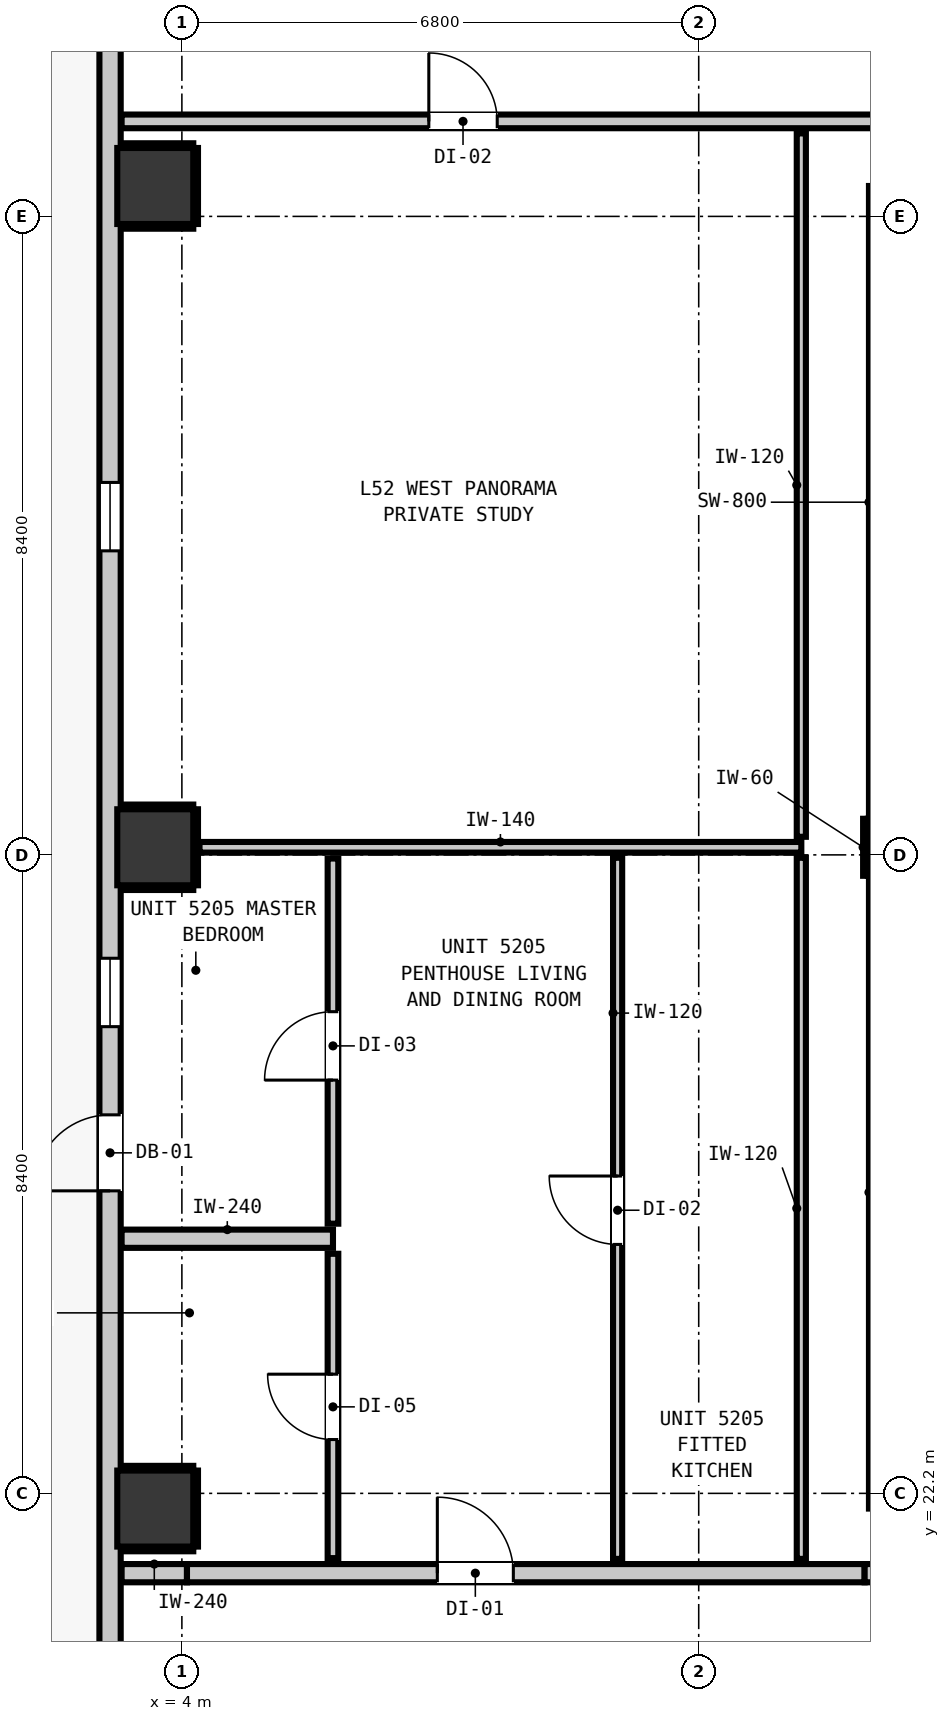
"""IFC4 building model, lengths in metres.
Left out: names, types, materials, properties, quantities, classifications, styles, units other than length and angle.
Written with IfcOpenShell. Run it as: python <this file> out.ifc"""

import sys

from ifc_helpers import new_model, si_unit, direction, frame, frame_2d, origin, origin_2d, place, context, subcontext, project, spatial, rectangle, extrude, element, fill, save


model = new_model("IFC4")
c1 = context("Model", 3, precision=1e-05, world=origin(), true_north=direction((0.0, 1.0)))
c2 = subcontext(c1, "Body", "Model", "MODEL_VIEW")
j1 = project(units=[si_unit("LENGTHUNIT", "METRE"), si_unit("PLANEANGLEUNIT", "RADIAN")], contexts=[c1])
p1 = place(None, origin())
s1 = spatial("IfcSite", under=j1, at=p1, CompositionType="ELEMENT")
p2 = place(p1, origin())
s2 = spatial("IfcBuilding", under=s1, at=p2, CompositionType="ELEMENT")
p3 = place(p2, frame((0.0, 0.0, 180.2)))
s3 = spatial("IfcBuildingStorey", under=s2, at=p3, CompositionType="ELEMENT", Elevation=180.2)
p4 = place(p3, frame((13.4, 30.7, 0.0), z_axis=(0.0, 0.0, 1.0), x_axis=(1.0, 0.0, 0.0)))
e1 = element("IfcColumn", 1, at=p4, inside=s3, PredefinedType="COLUMN", context=c2, shape_type="SweptSolid", body=[
    extrude(rectangle(XDim=0.75, YDim=0.75, at=origin_2d()), origin(), (0.0, 0.0, 1.0), 3.32),
])
p5 = place(p3, frame((13.44, 22.0, 0.0), z_axis=(0.0, 0.0, 1.0), x_axis=(0.0, 1.0, 0.0)))
e2 = element("IfcWall", 2, at=p5, inside=s3, PredefinedType="SHEAR", context=c2, shape_type="SweptSolid", body=[
    extrude(rectangle(XDim=8.32, YDim=0.8, at=frame_2d((4.16, 0.0))), origin(), (0.0, 0.0, 1.0), 3.32),
])
p6 = place(p3, frame((13.44, 31.08, 0.0), z_axis=(0.0, 0.0, 1.0), x_axis=(0.0, 1.0, 0.0)))
e3 = element("IfcWall", 3, at=p6, inside=s3, PredefinedType="SHEAR", context=c2, shape_type="SweptSolid", body=[
    extrude(rectangle(XDim=8.32, YDim=0.8, at=frame_2d((4.16, 0.0))), origin(), (0.0, 0.0, 1.0), 3.32),
])
for number, where, z_axis, x_axis in (
    (4, (3.65, 22.0, 0.0), (0.0, 0.0, 1.0), (1.0, 0.0, 0.0)),
    (5, (3.65, 30.7, 0.0), (0.0, 0.0, 1.0), (1.0, 0.0, 0.0)),
    (6, (3.65, 39.4, 0.0), (0.0, 0.0, 1.0), (1.0, 0.0, 0.0)),
):
    element("IfcColumn", number, at=place(p3, frame(where, z_axis=z_axis, x_axis=x_axis)), inside=s3, PredefinedType="COLUMN", context=c2, shape_type="SweptSolid", body=[
        extrude(rectangle(XDim=1.0, YDim=1.0, at=origin_2d()), origin(), (0.0, 0.0, 1.0), 3.32),
    ])
p7 = place(p3, frame((3.055, 17.555, 0.0), z_axis=(0.0, 0.0, 1.0), x_axis=(0.0, 1.0, 0.0)))
e7 = element("IfcWall", 7, at=p7, inside=s3, PredefinedType="STANDARD", context=c2, shape_type="SweptSolid", body=[
    extrude(rectangle(XDim=32.29, YDim=0.28, at=frame_2d((16.145, 0.0))), origin(), (0.0, 0.0, 1.0), 3.08),
])
p8 = place(p7, frame((8.625, 0.0, 0.0)))
e8 = element("IfcOpeningElement", 8, at=p8, cuts=e7, PredefinedType="OPENING", context=c2, shape_type="SweptSolid", body=[
    extrude(rectangle(XDim=1.0, YDim=2.15, at=frame_2d((0.5, 1.075))), frame((0.0, 0.15, 0.0), z_axis=(0.0, -1.0, 0.0), x_axis=(1.0, 0.0, 0.0)), (0.0, 0.0, 1.0), 0.3),
])
p9 = place(p7, frame((30.322, 0.0, 0.85)))
e9 = element("IfcOpeningElement", 9, at=p9, cuts=e7, PredefinedType="OPENING", context=c2, shape_type="SweptSolid", body=[
    extrude(rectangle(XDim=0.9, YDim=1.5, at=frame_2d((0.45, 0.75))), frame((0.0, 0.15, 0.0), z_axis=(0.0, -1.0, 0.0), x_axis=(1.0, 0.0, 0.0)), (0.0, 0.0, 1.0), 0.3),
])
p10 = place(p7, frame((10.785, 0.0, 0.85)))
e10 = element("IfcOpeningElement", 10, at=p10, cuts=e7, PredefinedType="OPENING", context=c2, shape_type="SweptSolid", body=[
    extrude(rectangle(XDim=0.9, YDim=1.5, at=frame_2d((0.45, 0.75))), frame((0.0, 0.15, 0.0), z_axis=(0.0, -1.0, 0.0), x_axis=(1.0, 0.0, 0.0)), (0.0, 0.0, 1.0), 0.3),
])
p11 = place(p7, frame((17.045, 0.0, 0.85)))
e11 = element("IfcOpeningElement", 11, at=p11, cuts=e7, PredefinedType="OPENING", context=c2, shape_type="SweptSolid", body=[
    extrude(rectangle(XDim=0.9, YDim=1.5, at=frame_2d((0.45, 0.75))), frame((0.0, 0.15, 0.0), z_axis=(0.0, -1.0, 0.0), x_axis=(1.0, 0.0, 0.0)), (0.0, 0.0, 1.0), 0.3),
])
p12 = place(p3, frame((3.207, 21.15, 0.0), z_axis=(0.0, 0.0, 1.0), x_axis=(1.0, 0.0, 0.0)))
e12 = element("IfcWall", 12, at=p12, inside=s3, PredefinedType="PARTITIONING", context=c2, shape_type="SweptSolid", body=[
    extrude(rectangle(XDim=0.86, YDim=0.24, at=frame_2d((0.43, 0.0))), origin(), (0.0, 0.0, 1.0), 3.08),
])
p13 = place(p3, frame((4.067, 21.15, 0.0), z_axis=(0.0, 0.0, 1.0), x_axis=(1.0, 0.0, 0.0)))
e13 = element("IfcWall", 13, at=p13, inside=s3, PredefinedType="PARTITIONING", context=c2, shape_type="SweptSolid", body=[
    extrude(rectangle(XDim=8.916, YDim=0.24, at=frame_2d((4.458, 0.0))), origin(), (0.0, 0.0, 1.0), 2.565),
])
p14 = place(p13, frame((3.294, 0.0, 0.0)))
e14 = element("IfcOpeningElement", 14, at=p14, cuts=e13, PredefinedType="OPENING", context=c2, shape_type="SweptSolid", body=[
    extrude(rectangle(XDim=1.0, YDim=2.15, at=frame_2d((0.5, 1.075))), frame((0.0, 0.13, 0.0), z_axis=(0.0, -1.0, 0.0), x_axis=(1.0, 0.0, 0.0)), (0.0, 0.0, 1.0), 0.26),
])
p15 = place(p3, frame((12.983, 21.15, 0.0), z_axis=(0.0, 0.0, 1.0), x_axis=(1.0, 0.0, 0.0)))
e15 = element("IfcWall", 15, at=p15, inside=s3, PredefinedType="PARTITIONING", context=c2, shape_type="SweptSolid", body=[
    extrude(rectangle(XDim=29.61, YDim=0.24, at=frame_2d((14.805, 0.0))), origin(), (0.0, 0.0, 1.0), 3.08),
])
p16 = place(p15, frame((5.227, 0.0, 0.0)))
e16 = element("IfcOpeningElement", 16, at=p16, cuts=e15, PredefinedType="OPENING", context=c2, shape_type="SweptSolid", body=[
    extrude(rectangle(XDim=1.1, YDim=2.15, at=frame_2d((0.55, 1.075))), frame((0.0, 0.13, 0.0), z_axis=(0.0, -1.0, 0.0), x_axis=(1.0, 0.0, 0.0)), (0.0, 0.0, 1.0), 0.26),
])
p17 = place(p15, frame((26.718, 0.0, 0.0)))
e17 = element("IfcOpeningElement", 17, at=p17, cuts=e15, PredefinedType="OPENING", context=c2, shape_type="SweptSolid", body=[
    extrude(rectangle(XDim=0.9, YDim=2.1, at=frame_2d((0.45, 1.05))), frame((0.0, 0.13, 0.0), z_axis=(0.0, -1.0, 0.0), x_axis=(1.0, 0.0, 0.0)), (0.0, 0.0, 1.0), 0.26),
])
p18 = place(p3, frame((3.207, 25.55, 0.0), z_axis=(0.0, 0.0, 1.0), x_axis=(1.0, 0.0, 0.0)))
e18 = element("IfcWall", 18, at=p18, inside=s3, PredefinedType="PARTITIONING", context=c2, shape_type="SweptSolid", body=[
    extrude(rectangle(XDim=2.781, YDim=0.24, at=frame_2d((1.391, 0.0))), origin(), (0.0, 0.0, 1.0), 3.08),
])
p19 = place(p3, frame((3.207, 40.25, 0.0), z_axis=(0.0, 0.0, 1.0), x_axis=(1.0, 0.0, 0.0)))
e19 = element("IfcWall", 19, at=p19, inside=s3, PredefinedType="PARTITIONING", context=c2, shape_type="SweptSolid", body=[
    extrude(rectangle(XDim=39.386, YDim=0.18, at=frame_2d((19.693, 0.0))), origin(), (0.0, 0.0, 1.0), 3.08),
])
p20 = place(p19, frame((14.228, 0.0, 0.0)))
e20 = element("IfcOpeningElement", 20, at=p20, cuts=e19, PredefinedType="OPENING", context=c2, shape_type="SweptSolid", body=[
    extrude(rectangle(XDim=1.4, YDim=2.15, at=frame_2d((0.7, 1.075))), frame((0.0, 0.1, 0.0), z_axis=(0.0, -1.0, 0.0), x_axis=(1.0, 0.0, 0.0)), (0.0, 0.0, 1.0), 0.2),
])
p21 = place(p19, frame((4.042, 0.0, 0.0)))
e21 = element("IfcOpeningElement", 21, at=p21, cuts=e19, PredefinedType="OPENING", context=c2, shape_type="SweptSolid", body=[
    extrude(rectangle(XDim=0.9, YDim=2.1, at=frame_2d((0.45, 1.05))), frame((0.0, 0.1, 0.0), z_axis=(0.0, -1.0, 0.0), x_axis=(1.0, 0.0, 0.0)), (0.0, 0.0, 1.0), 0.2),
])
p22 = place(p19, frame((36.444, 0.0, 0.0)))
e22 = element("IfcOpeningElement", 22, at=p22, cuts=e19, PredefinedType="OPENING", context=c2, shape_type="SweptSolid", body=[
    extrude(rectangle(XDim=1.0, YDim=2.15, at=frame_2d((0.5, 1.075))), frame((0.0, 0.1, 0.0), z_axis=(0.0, -1.0, 0.0), x_axis=(1.0, 0.0, 0.0)), (0.0, 0.0, 1.0), 0.2),
])
p23 = place(p3, frame((4.232, 30.7, 0.0), z_axis=(0.0, 0.0, 1.0), x_axis=(1.0, 0.0, 0.0)))
e23 = element("IfcWall", 23, at=p23, inside=s3, PredefinedType="PARTITIONING", context=c2, shape_type="SweptSolid", body=[
    extrude(rectangle(XDim=7.918, YDim=0.14, at=frame_2d((3.959, 0.0))), origin(), (0.0, 0.0, 1.0), 2.315),
])
p24 = place(p3, frame((5.988, 21.348, 0.0), z_axis=(0.0, 0.0, 1.0), x_axis=(0.0, 1.0, 0.0)))
e24 = element("IfcWall", 24, at=p24, inside=s3, PredefinedType="PARTITIONING", context=c2, shape_type="SweptSolid", body=[
    extrude(rectangle(XDim=4.004, YDim=0.14, at=frame_2d((2.002, 0.0))), origin(), (0.0, 0.0, 1.0), 3.08),
])
p25 = place(p24, frame((1.56, 0.0, 0.0)))
e25 = element("IfcOpeningElement", 25, at=p25, cuts=e24, PredefinedType="OPENING", context=c2, shape_type="SweptSolid", body=[
    extrude(rectangle(XDim=0.86, YDim=2.02, at=frame_2d((0.43, 1.01))), frame((0.0, 0.08, 0.0), z_axis=(0.0, -1.0, 0.0), x_axis=(1.0, 0.0, 0.0)), (0.0, 0.0, 1.0), 0.16),
])
p26 = place(p3, frame((5.988, 25.748, 0.0), z_axis=(0.0, 0.0, 1.0), x_axis=(0.0, 1.0, 0.0)))
e26 = element("IfcWall", 26, at=p26, inside=s3, PredefinedType="PARTITIONING", context=c2, shape_type="SweptSolid", body=[
    extrude(rectangle(XDim=4.804, YDim=0.14, at=frame_2d((2.402, 0.0))), origin(), (0.0, 0.0, 1.0), 3.08),
])
p27 = place(p26, frame((1.889, 0.0, 0.0)))
e27 = element("IfcOpeningElement", 27, at=p27, cuts=e26, PredefinedType="OPENING", context=c2, shape_type="SweptSolid", body=[
    extrude(rectangle(XDim=0.9, YDim=2.1, at=frame_2d((0.45, 1.05))), frame((0.0, 0.08, 0.0), z_axis=(0.0, -1.0, 0.0), x_axis=(1.0, 0.0, 0.0)), (0.0, 0.0, 1.0), 0.16),
])
p28 = place(p3, frame((9.733, 21.338, 0.0), z_axis=(0.0, 0.0, 1.0), x_axis=(0.0, 1.0, 0.0)))
e28 = element("IfcWall", 28, at=p28, inside=s3, PredefinedType="PARTITIONING", context=c2, shape_type="SweptSolid", body=[
    extrude(rectangle(XDim=9.224, YDim=0.12, at=frame_2d((4.612, 0.0))), origin(), (0.0, 0.0, 1.0), 3.08),
])
p29 = place(p28, frame((4.137, 0.0, 0.0)))
e29 = element("IfcOpeningElement", 29, at=p29, cuts=e28, PredefinedType="OPENING", context=c2, shape_type="SweptSolid", body=[
    extrude(rectangle(XDim=0.9, YDim=2.1, at=frame_2d((0.45, 1.05))), frame((0.0, 0.07, 0.0), z_axis=(0.0, -1.0, 0.0), x_axis=(1.0, 0.0, 0.0)), (0.0, 0.0, 1.0), 0.14),
])
p30 = place(p3, frame((12.15, 21.338, 0.0), z_axis=(0.0, 0.0, 1.0), x_axis=(0.0, 1.0, 0.0)))
e30 = element("IfcWall", 30, at=p30, inside=s3, PredefinedType="PARTITIONING", context=c2, shape_type="SweptSolid", body=[
    extrude(rectangle(XDim=9.224, YDim=0.12, at=frame_2d((4.612, 0.0))), origin(), (0.0, 0.0, 1.0), 3.08),
])
p31 = place(p3, frame((12.15, 30.838, 0.0), z_axis=(0.0, 0.0, 1.0), x_axis=(0.0, 1.0, 0.0)))
e31 = element("IfcWall", 31, at=p31, inside=s3, PredefinedType="PARTITIONING", context=c2, shape_type="SweptSolid", body=[
    extrude(rectangle(XDim=9.254, YDim=0.12, at=frame_2d((4.627, 0.0))), origin(), (0.0, 0.0, 1.0), 3.08),
])
p32 = place(p3, frame((12.993, 30.325, 0.0), z_axis=(0.0, 0.0, 1.0), x_axis=(0.0, 1.0, 0.0)))
e32 = element("IfcWall", 32, at=p32, inside=s3, PredefinedType="PARTITIONING", context=c2, shape_type="SweptSolid", body=[
    extrude(rectangle(XDim=0.75, YDim=0.06, at=frame_2d((0.375, 0.0))), origin(), (0.0, 0.0, 1.0), 1.45),
])
for number, where, z_axis, x_axis in (
    (33, (3.21, 21.468, 0.0), (0.0, 0.0, 1.0), (1.0, 0.0, 0.0)),
    (34, (3.21, 22.532, 0.0), (0.0, 0.0, 1.0), (1.0, 0.0, 0.0)),
):
    element("IfcWall", number, at=place(p3, frame(where, z_axis=z_axis, x_axis=x_axis)), inside=s3, PredefinedType="PARTITIONING", context=c2, shape_type="SweptSolid", body=[
        extrude(rectangle(XDim=0.94, YDim=0.06, at=frame_2d((0.47, 0.0))), origin(), (0.0, 0.0, 1.0), 1.45),
    ])
p33 = place(p3, frame((4.182, 21.5, 0.0), z_axis=(0.0, 0.0, 1.0), x_axis=(0.0, 1.0, 0.0)))
e35 = element("IfcWall", 35, at=p33, inside=s3, PredefinedType="PARTITIONING", context=c2, shape_type="SweptSolid", body=[
    extrude(rectangle(XDim=1.0, YDim=0.06, at=frame_2d((0.5, 0.0))), origin(), (0.0, 0.0, 1.0), 1.45),
])
for number, where, z_axis, x_axis in (
    (36, (3.21, 30.168, 0.0), (0.0, 0.0, 1.0), (1.0, 0.0, 0.0)),
    (37, (3.21, 31.232, 0.0), (0.0, 0.0, 1.0), (1.0, 0.0, 0.0)),
):
    element("IfcWall", number, at=place(p3, frame(where, z_axis=z_axis, x_axis=x_axis)), inside=s3, PredefinedType="PARTITIONING", context=c2, shape_type="SweptSolid", body=[
        extrude(rectangle(XDim=0.94, YDim=0.06, at=frame_2d((0.47, 0.0))), origin(), (0.0, 0.0, 1.0), 1.45),
    ])
p34 = place(p3, frame((4.182, 30.2, 0.0), z_axis=(0.0, 0.0, 1.0), x_axis=(0.0, 1.0, 0.0)))
e38 = element("IfcWall", 38, at=p34, inside=s3, PredefinedType="PARTITIONING", context=c2, shape_type="SweptSolid", body=[
    extrude(rectangle(XDim=1.0, YDim=0.06, at=frame_2d((0.5, 0.0))), origin(), (0.0, 0.0, 1.0), 1.45),
])
for number, where, z_axis, x_axis in (
    (39, (3.21, 38.868, 0.0), (0.0, 0.0, 1.0), (1.0, 0.0, 0.0)),
    (40, (3.21, 39.932, 0.0), (0.0, 0.0, 1.0), (1.0, 0.0, 0.0)),
):
    element("IfcWall", number, at=place(p3, frame(where, z_axis=z_axis, x_axis=x_axis)), inside=s3, PredefinedType="PARTITIONING", context=c2, shape_type="SweptSolid", body=[
        extrude(rectangle(XDim=0.94, YDim=0.06, at=frame_2d((0.47, 0.0))), origin(), (0.0, 0.0, 1.0), 1.45),
    ])
p35 = place(p3, frame((4.182, 38.9, 0.0), z_axis=(0.0, 0.0, 1.0), x_axis=(0.0, 1.0, 0.0)))
e41 = element("IfcWall", 41, at=p35, inside=s3, PredefinedType="PARTITIONING", context=c2, shape_type="SweptSolid", body=[
    extrude(rectangle(XDim=1.0, YDim=0.06, at=frame_2d((0.5, 0.0))), origin(), (0.0, 0.0, 1.0), 1.45),
])
p36 = place(p8, origin())
e42 = element("IfcDoor", 42, at=p36, inside=s3, OperationType="SINGLE_SWING_LEFT", PredefinedType="DOOR", context=c2, shape_type="SweptSolid", body=[
    extrude(rectangle(XDim=1.0, YDim=2.15, at=frame_2d((0.5, 1.075))), frame((0.0, 0.025, 0.0), z_axis=(0.0, -1.0, 0.0), x_axis=(1.0, 0.0, 0.0)), (0.0, 0.0, 1.0), 0.05),
])
fill(e8, e42)
p37 = place(p10, origin())
e43 = element("IfcWindow", 43, at=p37, inside=s3, PartitioningType="SINGLE_PANEL", PredefinedType="WINDOW", context=c2, shape_type="SweptSolid", body=[
    extrude(rectangle(XDim=0.9, YDim=1.5, at=frame_2d((0.45, 0.75))), frame((0.0, 0.03, 0.0), z_axis=(0.0, -1.0, 0.0), x_axis=(1.0, 0.0, 0.0)), (0.0, 0.0, 1.0), 0.06),
])
fill(e10, e43)
p38 = place(p11, origin())
e44 = element("IfcWindow", 44, at=p38, inside=s3, PartitioningType="SINGLE_PANEL", PredefinedType="WINDOW", context=c2, shape_type="SweptSolid", body=[
    extrude(rectangle(XDim=0.9, YDim=1.5, at=frame_2d((0.45, 0.75))), frame((0.0, 0.03, 0.0), z_axis=(0.0, -1.0, 0.0), x_axis=(1.0, 0.0, 0.0)), (0.0, 0.0, 1.0), 0.06),
])
fill(e11, e44)
p39 = place(p14, origin())
e45 = element("IfcDoor", 45, at=p39, inside=s3, OperationType="SINGLE_SWING_LEFT", PredefinedType="DOOR", context=c2, shape_type="SweptSolid", body=[
    extrude(rectangle(XDim=1.0, YDim=2.15, at=frame_2d((0.5, 1.075))), frame((0.0, 0.025, 0.0), z_axis=(0.0, -1.0, 0.0), x_axis=(1.0, 0.0, 0.0)), (0.0, 0.0, 1.0), 0.05),
])
fill(e14, e45)
p40 = place(p25, origin())
e46 = element("IfcDoor", 46, at=p40, inside=s3, OperationType="SINGLE_SWING_RIGHT", PredefinedType="DOOR", context=c2, shape_type="SweptSolid", body=[
    extrude(rectangle(XDim=0.86, YDim=2.02, at=frame_2d((0.43, 1.01))), frame((0.0, 0.025, 0.0), z_axis=(0.0, -1.0, 0.0), x_axis=(1.0, 0.0, 0.0)), (0.0, 0.0, 1.0), 0.05),
])
fill(e25, e46)
p41 = place(p27, origin())
e47 = element("IfcDoor", 47, at=p41, inside=s3, OperationType="SINGLE_SWING_LEFT", PredefinedType="DOOR", context=c2, shape_type="SweptSolid", body=[
    extrude(rectangle(XDim=0.9, YDim=2.1, at=frame_2d((0.45, 1.05))), frame((0.0, 0.025, 0.0), z_axis=(0.0, -1.0, 0.0), x_axis=(1.0, 0.0, 0.0)), (0.0, 0.0, 1.0), 0.05),
])
fill(e27, e47)
p42 = place(p29, origin())
e48 = element("IfcDoor", 48, at=p42, inside=s3, OperationType="SINGLE_SWING_RIGHT", PredefinedType="DOOR", context=c2, shape_type="SweptSolid", body=[
    extrude(rectangle(XDim=0.9, YDim=2.1, at=frame_2d((0.45, 1.05))), frame((0.0, 0.025, 0.0), z_axis=(0.0, -1.0, 0.0), x_axis=(1.0, 0.0, 0.0)), (0.0, 0.0, 1.0), 0.05),
])
fill(e29, e48)
p43 = place(p21, origin())
e49 = element("IfcDoor", 49, at=p43, inside=s3, OperationType="SINGLE_SWING_LEFT", PredefinedType="DOOR", context=c2, shape_type="SweptSolid", body=[
    extrude(rectangle(XDim=0.9, YDim=2.1, at=frame_2d((0.45, 1.05))), frame((0.0, 0.025, 0.0), z_axis=(0.0, -1.0, 0.0), x_axis=(1.0, 0.0, 0.0)), (0.0, 0.0, 1.0), 0.05),
])
fill(e21, e49)
save(model, sys.argv[1])
